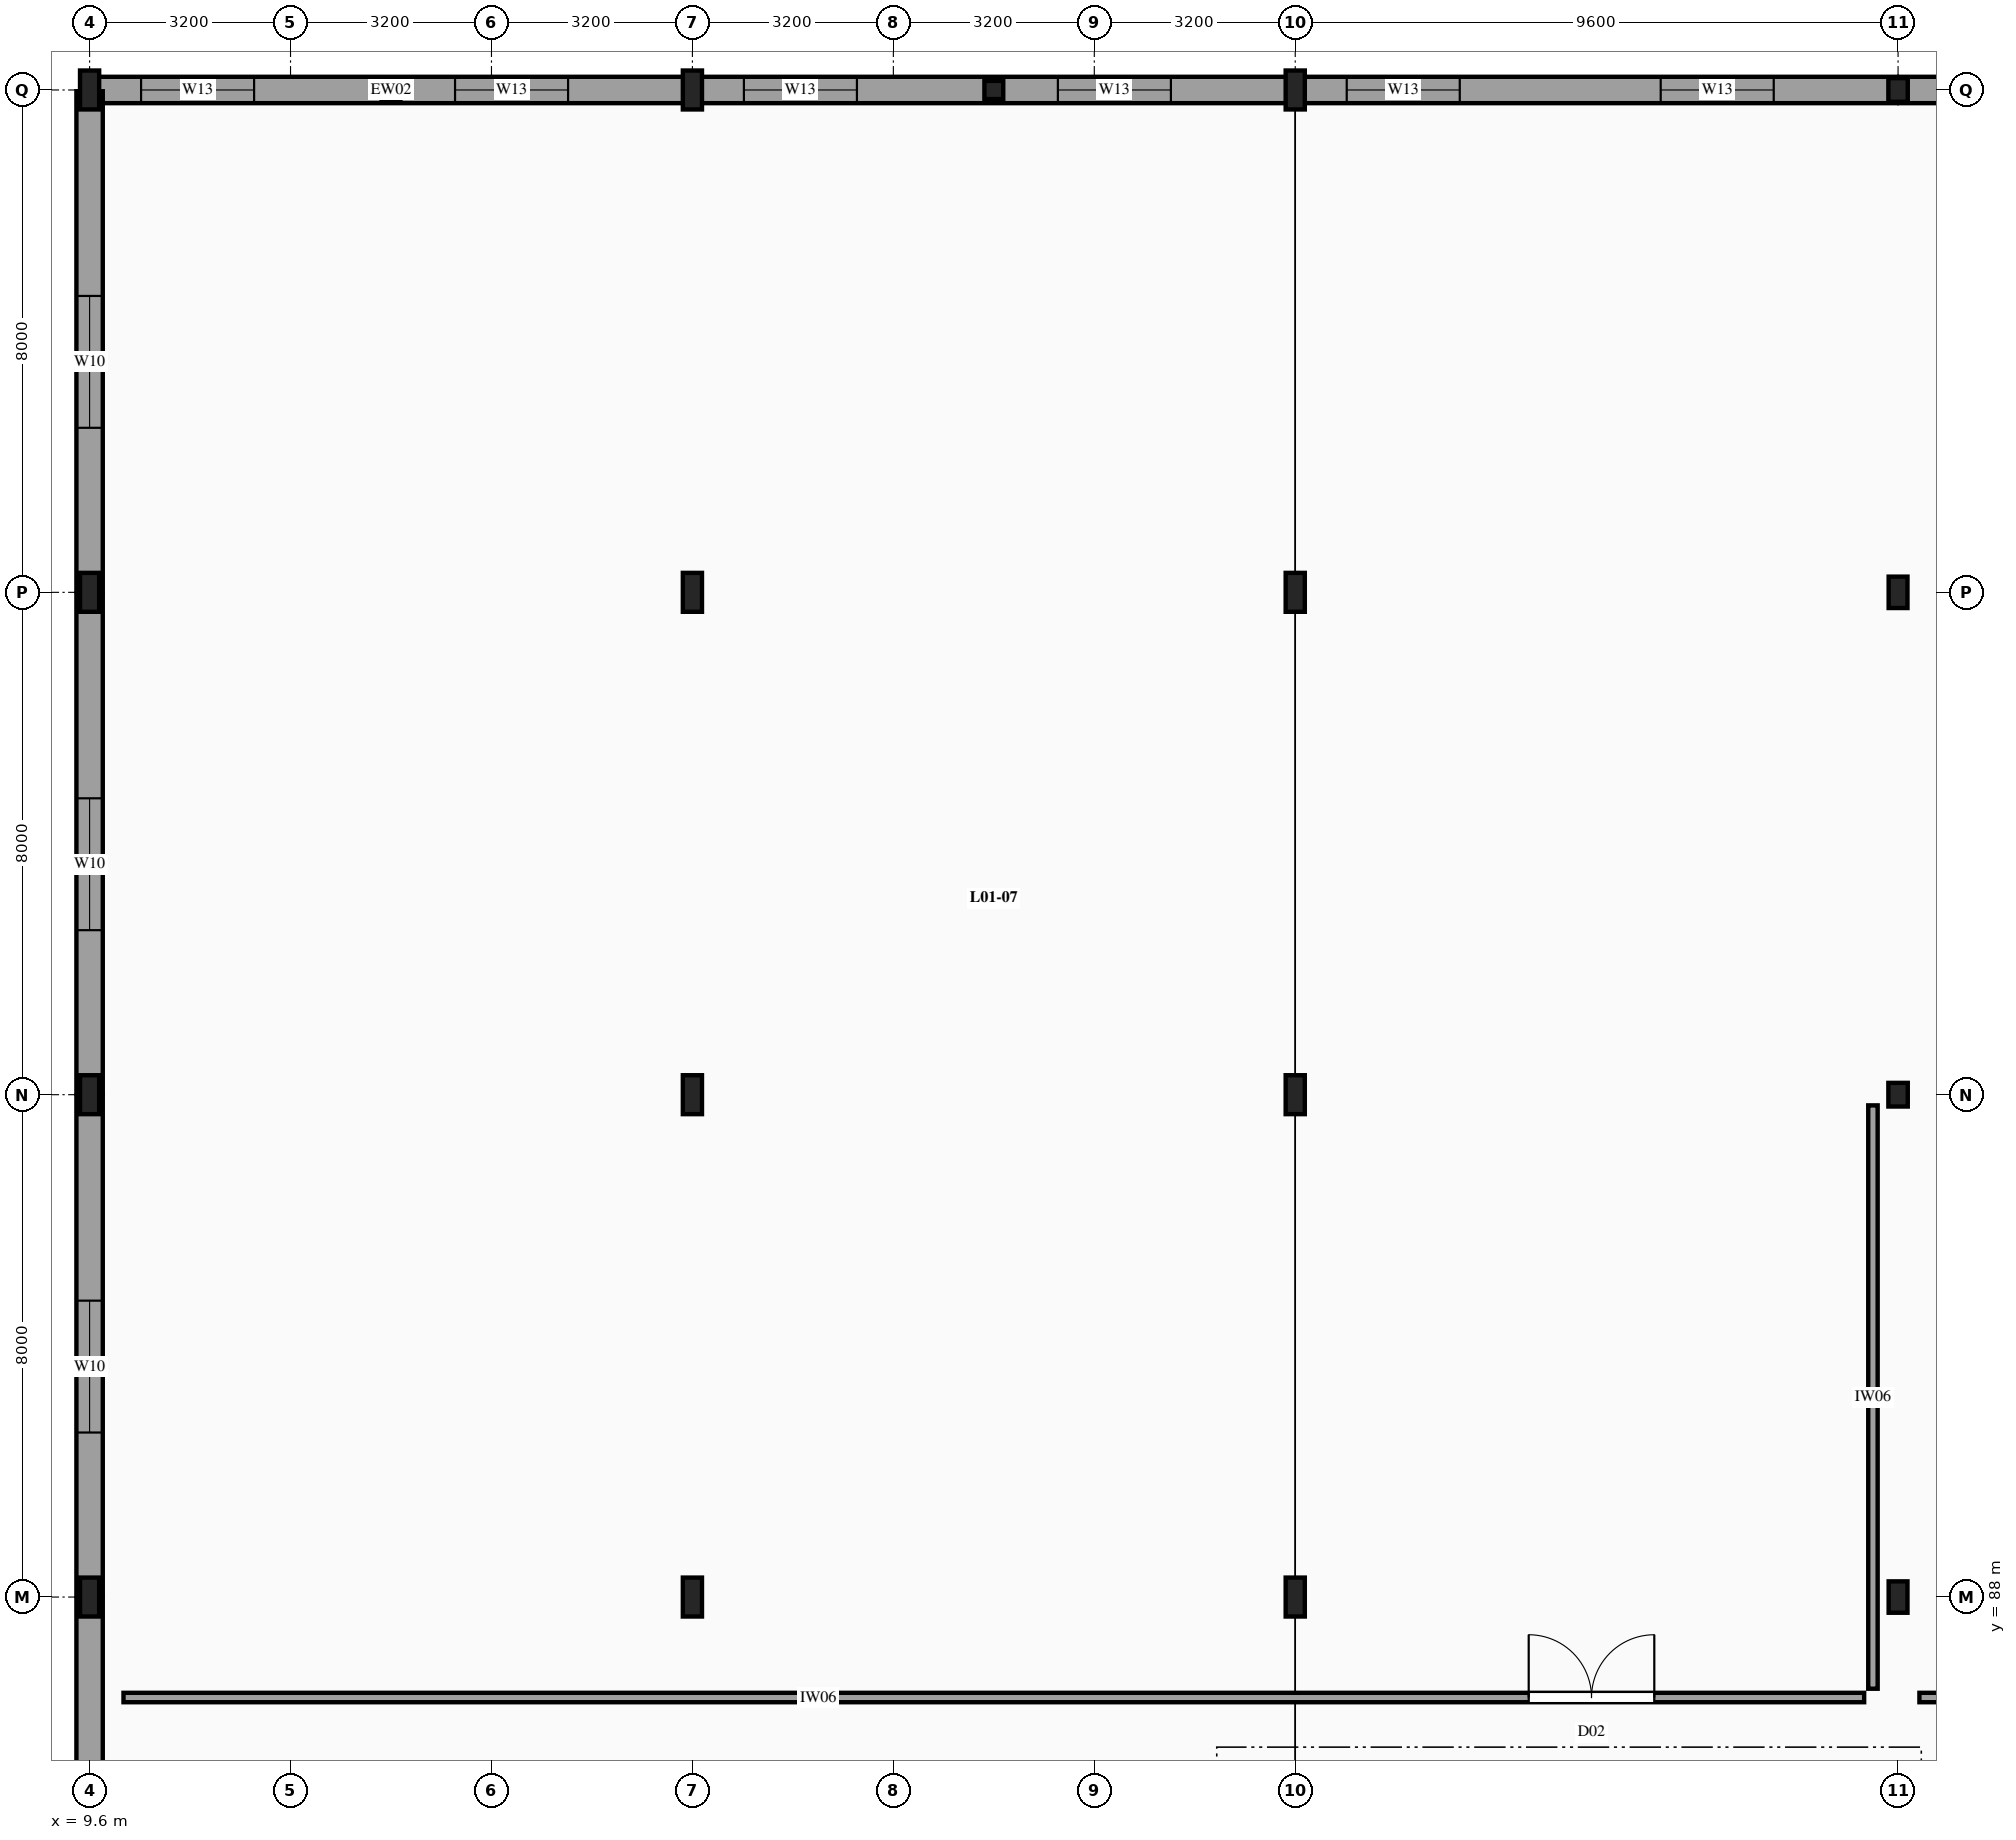
"""IFC4 building model, lengths in metres.
Left out: names, types, materials, properties, quantities, classifications, styles, units other than length and angle.
Written with IfcOpenShell. Run it as: python <this file> out.ifc"""

import sys

from ifc_helpers import new_model, si_unit, direction, frame, frame_2d, origin, origin_2d, place, context, subcontext, project, spatial, rectangle, i_section, extrude, element, fill, save


model = new_model("IFC4")
c1 = context("Model", 3, precision=1e-05, world=origin(), true_north=direction((0.0, 1.0)))
c2 = subcontext(c1, "Body", "Model", "MODEL_VIEW")
j1 = project(units=[si_unit("LENGTHUNIT", "METRE"), si_unit("PLANEANGLEUNIT", "RADIAN")], contexts=[c1])
p1 = place(None, origin())
s1 = spatial("IfcSite", under=j1, at=p1, CompositionType="ELEMENT")
p2 = place(p1, origin())
s2 = spatial("IfcBuilding", under=s1, at=p2, CompositionType="ELEMENT")
p3 = place(p2, frame((0.0, 0.0, 4.5)))
s3 = spatial("IfcBuildingStorey", under=s2, at=p3, CompositionType="ELEMENT", Elevation=4.5)
for number, where, z_axis, x_axis in (
    (1, (9.6, 88.0, -0.26), (0.0, 0.0, 1.0), (1.0, 0.0, 0.0)),
    (2, (9.6, 96.0, -0.26), (0.0, 0.0, 1.0), (1.0, 0.0, 0.0)),
    (3, (9.6, 104.0, -0.26), (0.0, 0.0, 1.0), (1.0, 0.0, 0.0)),
    (4, (9.6, 112.0, -0.26), (0.0, 0.0, 1.0), (1.0, 0.0, 0.0)),
    (5, (19.2, 88.0, -0.26), (0.0, 0.0, 1.0), (1.0, 0.0, 0.0)),
    (6, (19.2, 96.0, -0.26), (0.0, 0.0, 1.0), (1.0, 0.0, 0.0)),
    (7, (19.2, 104.0, -0.26), (0.0, 0.0, 1.0), (1.0, 0.0, 0.0)),
    (8, (19.2, 112.0, -0.26), (0.0, 0.0, 1.0), (1.0, 0.0, 0.0)),
    (9, (28.8, 88.0, -0.26), (0.0, 0.0, 1.0), (1.0, 0.0, 0.0)),
    (10, (28.8, 96.0, -0.26), (0.0, 0.0, 1.0), (1.0, 0.0, 0.0)),
    (11, (28.8, 104.0, -0.26), (0.0, 0.0, 1.0), (1.0, 0.0, 0.0)),
    (12, (28.8, 112.0, -0.26), (0.0, 0.0, 1.0), (1.0, 0.0, 0.0)),
):
    element("IfcColumn", number, at=place(p3, frame(where, z_axis=z_axis, x_axis=x_axis)), inside=s3, PredefinedType="COLUMN", context=c2, shape_type="SweptSolid", body=[
        extrude(i_section(OverallWidth=0.305, OverallDepth=0.62, WebThickness=0.021, FlangeThickness=0.04, FilletRadius=0.027, at=origin_2d()), origin(), (0.0, 0.0, 1.0), 4.2),
    ])
p4 = place(p3, frame((38.4, 88.0, -0.26), z_axis=(0.0, 0.0, 1.0), x_axis=(1.0, 0.0, 0.0)))
e13 = element("IfcColumn", 13, at=p4, inside=s3, PredefinedType="COLUMN", context=c2, shape_type="SweptSolid", body=[
    extrude(i_section(OverallWidth=0.3, OverallDepth=0.5, WebThickness=0.014, FlangeThickness=0.028, FilletRadius=0.027, at=origin_2d()), origin(), (0.0, 0.0, 1.0), 4.2),
])
p5 = place(p3, frame((38.4, 96.0, -0.26), z_axis=(0.0, 0.0, 1.0), x_axis=(1.0, 0.0, 0.0)))
e14 = element("IfcColumn", 14, at=p5, inside=s3, PredefinedType="COLUMN", context=c2, shape_type="SweptSolid", body=[
    extrude(i_section(OverallWidth=0.309, OverallDepth=0.377, WebThickness=0.021, FlangeThickness=0.04, FilletRadius=0.027, at=origin_2d()), origin(), (0.0, 0.0, 1.0), 4.2),
])
p6 = place(p3, frame((38.4, 104.0, -0.26), z_axis=(0.0, 0.0, 1.0), x_axis=(1.0, 0.0, 0.0)))
e15 = element("IfcColumn", 15, at=p6, inside=s3, PredefinedType="COLUMN", context=c2, shape_type="SweptSolid", body=[
    extrude(i_section(OverallWidth=0.3, OverallDepth=0.5, WebThickness=0.014, FlangeThickness=0.028, FilletRadius=0.027, at=origin_2d()), origin(), (0.0, 0.0, 1.0), 4.2),
])
p7 = place(p3, frame((38.4, 112.0, -0.26), z_axis=(0.0, 0.0, 1.0), x_axis=(1.0, 0.0, 0.0)))
e16 = element("IfcColumn", 16, at=p7, inside=s3, PredefinedType="COLUMN", context=c2, shape_type="SweptSolid", body=[
    extrude(i_section(OverallWidth=0.309, OverallDepth=0.377, WebThickness=0.021, FlangeThickness=0.04, FilletRadius=0.027, at=origin_2d()), origin(), (0.0, 0.0, 1.0), 4.2),
])
for number, where, z_axis, x_axis in (
    (17, (14.4, 112.0, -0.26), (0.0, 0.0, 1.0), (1.0, 0.0, 0.0)),
    (18, (24.0, 112.0, -0.26), (0.0, 0.0, 1.0), (1.0, 0.0, 0.0)),
):
    element("IfcColumn", number, at=place(p3, frame(where, z_axis=z_axis, x_axis=x_axis)), inside=s3, PredefinedType="PILASTER", context=c2, shape_type="SweptSolid", body=[
        extrude(i_section(OverallWidth=0.3, OverallDepth=0.29, WebThickness=0.009, FlangeThickness=0.014, FilletRadius=0.027, at=origin_2d()), origin(), (0.0, 0.0, 1.0), 4.2),
    ])
p8 = place(p3, frame((9.62, 112.0, 0.0), z_axis=(0.0, 0.0, 1.0), x_axis=(1.0, 0.0, 0.0)))
e19 = element("IfcWall", 19, at=p8, inside=s3, PredefinedType="SOLIDWALL", context=c2, shape_type="SweptSolid", body=[
    extrude(rectangle(XDim=9.56, YDim=0.42, at=frame_2d((4.78, 0.0))), origin(), (0.0, 0.0, 1.0), 3.26),
])
p9 = place(p8, frame((0.8, 0.0, 0.72)))
e20 = element("IfcOpeningElement", 20, at=p9, cuts=e19, PredefinedType="OPENING", context=c2, shape_type="SweptSolid", body=[
    extrude(rectangle(XDim=1.8, YDim=1.6, at=frame_2d((0.9, 0.8))), frame((0.0, 0.22, 0.0), z_axis=(0.0, -1.0, 0.0), x_axis=(1.0, 0.0, 0.0)), (0.0, 0.0, 1.0), 0.44),
])
p10 = place(p8, frame((5.8, 0.0, 0.72)))
e21 = element("IfcOpeningElement", 21, at=p10, cuts=e19, PredefinedType="OPENING", context=c2, shape_type="SweptSolid", body=[
    extrude(rectangle(XDim=1.8, YDim=1.6, at=frame_2d((0.9, 0.8))), frame((0.0, 0.22, 0.0), z_axis=(0.0, -1.0, 0.0), x_axis=(1.0, 0.0, 0.0)), (0.0, 0.0, 1.0), 0.44),
])
p11 = place(p3, frame((19.22, 112.0, 0.0), z_axis=(0.0, 0.0, 1.0), x_axis=(1.0, 0.0, 0.0)))
e22 = element("IfcWall", 22, at=p11, inside=s3, PredefinedType="SOLIDWALL", context=c2, shape_type="SweptSolid", body=[
    extrude(rectangle(XDim=9.56, YDim=0.42, at=frame_2d((4.78, 0.0))), origin(), (0.0, 0.0, 1.0), 3.26),
])
p12 = place(p11, frame((0.8, 0.0, 0.72)))
e23 = element("IfcOpeningElement", 23, at=p12, cuts=e22, PredefinedType="OPENING", context=c2, shape_type="SweptSolid", body=[
    extrude(rectangle(XDim=1.8, YDim=1.6, at=frame_2d((0.9, 0.8))), frame((0.0, 0.22, 0.0), z_axis=(0.0, -1.0, 0.0), x_axis=(1.0, 0.0, 0.0)), (0.0, 0.0, 1.0), 0.44),
])
p13 = place(p11, frame((5.8, 0.0, 0.72)))
e24 = element("IfcOpeningElement", 24, at=p13, cuts=e22, PredefinedType="OPENING", context=c2, shape_type="SweptSolid", body=[
    extrude(rectangle(XDim=1.8, YDim=1.6, at=frame_2d((0.9, 0.8))), frame((0.0, 0.22, 0.0), z_axis=(0.0, -1.0, 0.0), x_axis=(1.0, 0.0, 0.0)), (0.0, 0.0, 1.0), 0.44),
])
p14 = place(p3, frame((28.82, 112.0, 0.0), z_axis=(0.0, 0.0, 1.0), x_axis=(1.0, 0.0, 0.0)))
e25 = element("IfcWall", 25, at=p14, inside=s3, PredefinedType="SOLIDWALL", context=c2, shape_type="SweptSolid", body=[
    extrude(rectangle(XDim=9.56, YDim=0.42, at=frame_2d((4.78, 0.0))), origin(), (0.0, 0.0, 1.0), 3.26),
])
p15 = place(p14, frame((0.8, 0.0, 0.72)))
e26 = element("IfcOpeningElement", 26, at=p15, cuts=e25, PredefinedType="OPENING", context=c2, shape_type="SweptSolid", body=[
    extrude(rectangle(XDim=1.8, YDim=1.6, at=frame_2d((0.9, 0.8))), frame((0.0, 0.22, 0.0), z_axis=(0.0, -1.0, 0.0), x_axis=(1.0, 0.0, 0.0)), (0.0, 0.0, 1.0), 0.44),
])
p16 = place(p14, frame((5.8, 0.0, 0.72)))
e27 = element("IfcOpeningElement", 27, at=p16, cuts=e25, PredefinedType="OPENING", context=c2, shape_type="SweptSolid", body=[
    extrude(rectangle(XDim=1.8, YDim=1.6, at=frame_2d((0.9, 0.8))), frame((0.0, 0.22, 0.0), z_axis=(0.0, -1.0, 0.0), x_axis=(1.0, 0.0, 0.0)), (0.0, 0.0, 1.0), 0.44),
])
p17 = place(p3, frame((38.42, 112.0, 0.0), z_axis=(0.0, 0.0, 1.0), x_axis=(1.0, 0.0, 0.0)))
e28 = element("IfcWall", 28, at=p17, inside=s3, PredefinedType="SOLIDWALL", context=c2, shape_type="SweptSolid", body=[
    extrude(rectangle(XDim=9.56, YDim=0.42, at=frame_2d((4.78, 0.0))), origin(), (0.0, 0.0, 1.0), 3.26),
])
p18 = place(p3, frame((9.6, 80.02, 0.0), z_axis=(0.0, 0.0, 1.0), x_axis=(0.0, 1.0, 0.0)))
e29 = element("IfcWall", 29, at=p18, inside=s3, PredefinedType="SOLIDWALL", context=c2, shape_type="SweptSolid", body=[
    extrude(rectangle(XDim=7.96, YDim=0.42, at=frame_2d((3.98, 0.0))), origin(), (0.0, 0.0, 1.0), 3.26),
])
p19 = place(p18, frame((2.6, 0.0, 0.9)))
e30 = element("IfcOpeningElement", 30, at=p19, cuts=e29, PredefinedType="OPENING", context=c2, shape_type="SweptSolid", body=[
    extrude(rectangle(XDim=2.1, YDim=2.1, at=frame_2d((1.05, 1.05))), frame((0.0, 0.22, 0.0), z_axis=(0.0, -1.0, 0.0), x_axis=(1.0, 0.0, 0.0)), (0.0, 0.0, 1.0), 0.44),
])
p20 = place(p3, frame((9.6, 88.02, 0.0), z_axis=(0.0, 0.0, 1.0), x_axis=(0.0, 1.0, 0.0)))
e31 = element("IfcWall", 31, at=p20, inside=s3, PredefinedType="SOLIDWALL", context=c2, shape_type="SweptSolid", body=[
    extrude(rectangle(XDim=7.96, YDim=0.42, at=frame_2d((3.98, 0.0))), origin(), (0.0, 0.0, 1.0), 3.26),
])
p21 = place(p20, frame((2.6, 0.0, 0.9)))
e32 = element("IfcOpeningElement", 32, at=p21, cuts=e31, PredefinedType="OPENING", context=c2, shape_type="SweptSolid", body=[
    extrude(rectangle(XDim=2.1, YDim=2.1, at=frame_2d((1.05, 1.05))), frame((0.0, 0.22, 0.0), z_axis=(0.0, -1.0, 0.0), x_axis=(1.0, 0.0, 0.0)), (0.0, 0.0, 1.0), 0.44),
])
p22 = place(p3, frame((9.6, 96.02, 0.0), z_axis=(0.0, 0.0, 1.0), x_axis=(0.0, 1.0, 0.0)))
e33 = element("IfcWall", 33, at=p22, inside=s3, PredefinedType="SOLIDWALL", context=c2, shape_type="SweptSolid", body=[
    extrude(rectangle(XDim=7.96, YDim=0.42, at=frame_2d((3.98, 0.0))), origin(), (0.0, 0.0, 1.0), 3.26),
])
p23 = place(p22, frame((2.6, 0.0, 0.9)))
e34 = element("IfcOpeningElement", 34, at=p23, cuts=e33, PredefinedType="OPENING", context=c2, shape_type="SweptSolid", body=[
    extrude(rectangle(XDim=2.1, YDim=2.1, at=frame_2d((1.05, 1.05))), frame((0.0, 0.22, 0.0), z_axis=(0.0, -1.0, 0.0), x_axis=(1.0, 0.0, 0.0)), (0.0, 0.0, 1.0), 0.44),
])
p24 = place(p3, frame((9.6, 104.02, 0.0), z_axis=(0.0, 0.0, 1.0), x_axis=(0.0, 1.0, 0.0)))
e35 = element("IfcWall", 35, at=p24, inside=s3, PredefinedType="SOLIDWALL", context=c2, shape_type="SweptSolid", body=[
    extrude(rectangle(XDim=7.96, YDim=0.42, at=frame_2d((3.98, 0.0))), origin(), (0.0, 0.0, 1.0), 3.26),
])
p25 = place(p24, frame((2.6, 0.0, 0.9)))
e36 = element("IfcOpeningElement", 36, at=p25, cuts=e35, PredefinedType="OPENING", context=c2, shape_type="SweptSolid", body=[
    extrude(rectangle(XDim=2.1, YDim=2.1, at=frame_2d((1.05, 1.05))), frame((0.0, 0.22, 0.0), z_axis=(0.0, -1.0, 0.0), x_axis=(1.0, 0.0, 0.0)), (0.0, 0.0, 1.0), 0.44),
])
p26 = place(p3, frame((10.14, 86.4, 0.0), z_axis=(0.0, 0.0, 1.0), x_axis=(1.0, 0.0, 0.0)))
e37 = element("IfcWall", 37, at=p26, inside=s3, PredefinedType="PARTITIONING", context=c2, shape_type="SweptSolid", body=[
    extrude(rectangle(XDim=27.72, YDim=0.15, at=frame_2d((13.86, 0.0))), origin(), (0.0, 0.0, 1.0), 3.1),
])
p27 = place(p26, frame((22.378, 0.0, 0.0)))
e38 = element("IfcOpeningElement", 38, at=p27, cuts=e37, PredefinedType="OPENING", context=c2, shape_type="SweptSolid", body=[
    extrude(rectangle(XDim=2.0, YDim=2.6, at=frame_2d((1.0, 1.3))), frame((0.0, 0.085, 0.0), z_axis=(0.0, -1.0, 0.0), x_axis=(1.0, 0.0, 0.0)), (0.0, 0.0, 1.0), 0.17),
])
p28 = place(p3, frame((38.0, 86.54, 0.0), z_axis=(0.0, 0.0, 1.0), x_axis=(0.0, 1.0, 0.0)))
e39 = element("IfcWall", 39, at=p28, inside=s3, PredefinedType="PARTITIONING", context=c2, shape_type="SweptSolid", body=[
    extrude(rectangle(XDim=9.29, YDim=0.15, at=frame_2d((4.645, 0.0))), origin(), (0.0, 0.0, 1.0), 3.1),
])
p29 = place(p3, frame((38.74, 86.4, 0.0), z_axis=(0.0, 0.0, 1.0), x_axis=(1.0, 0.0, 0.0)))
e40 = element("IfcWall", 40, at=p29, inside=s3, PredefinedType="PARTITIONING", context=c2, shape_type="SweptSolid", body=[
    extrude(rectangle(XDim=18.32, YDim=0.15, at=frame_2d((9.16, 0.0))), origin(), (0.0, 0.0, 1.0), 3.1),
])
p30 = place(p29, frame((13.106, 0.0, 0.0)))
e41 = element("IfcOpeningElement", 41, at=p30, cuts=e40, PredefinedType="OPENING", context=c2, shape_type="SweptSolid", body=[
    extrude(rectangle(XDim=1.85, YDim=2.5, at=frame_2d((0.925, 1.25))), frame((0.0, 0.085, 0.0), z_axis=(0.0, -1.0, 0.0), x_axis=(1.0, 0.0, 0.0)), (0.0, 0.0, 1.0), 0.17),
])
p31 = place(p9, origin())
e42 = element("IfcWindow", 42, at=p31, inside=s3, PartitioningType="SINGLE_PANEL", PredefinedType="WINDOW", context=c2, shape_type="SweptSolid", body=[
    extrude(rectangle(XDim=1.8, YDim=1.6, at=frame_2d((0.9, 0.8))), frame((0.0, 0.03, 0.0), z_axis=(0.0, -1.0, 0.0), x_axis=(1.0, 0.0, 0.0)), (0.0, 0.0, 1.0), 0.06),
])
fill(e20, e42)
p32 = place(p10, origin())
e43 = element("IfcWindow", 43, at=p32, inside=s3, PartitioningType="SINGLE_PANEL", PredefinedType="WINDOW", context=c2, shape_type="SweptSolid", body=[
    extrude(rectangle(XDim=1.8, YDim=1.6, at=frame_2d((0.9, 0.8))), frame((0.0, 0.03, 0.0), z_axis=(0.0, -1.0, 0.0), x_axis=(1.0, 0.0, 0.0)), (0.0, 0.0, 1.0), 0.06),
])
fill(e21, e43)
p33 = place(p12, origin())
e44 = element("IfcWindow", 44, at=p33, inside=s3, PartitioningType="SINGLE_PANEL", PredefinedType="WINDOW", context=c2, shape_type="SweptSolid", body=[
    extrude(rectangle(XDim=1.8, YDim=1.6, at=frame_2d((0.9, 0.8))), frame((0.0, 0.03, 0.0), z_axis=(0.0, -1.0, 0.0), x_axis=(1.0, 0.0, 0.0)), (0.0, 0.0, 1.0), 0.06),
])
fill(e23, e44)
p34 = place(p13, origin())
e45 = element("IfcWindow", 45, at=p34, inside=s3, PartitioningType="SINGLE_PANEL", PredefinedType="WINDOW", context=c2, shape_type="SweptSolid", body=[
    extrude(rectangle(XDim=1.8, YDim=1.6, at=frame_2d((0.9, 0.8))), frame((0.0, 0.03, 0.0), z_axis=(0.0, -1.0, 0.0), x_axis=(1.0, 0.0, 0.0)), (0.0, 0.0, 1.0), 0.06),
])
fill(e24, e45)
p35 = place(p15, origin())
e46 = element("IfcWindow", 46, at=p35, inside=s3, PartitioningType="SINGLE_PANEL", PredefinedType="WINDOW", context=c2, shape_type="SweptSolid", body=[
    extrude(rectangle(XDim=1.8, YDim=1.6, at=frame_2d((0.9, 0.8))), frame((0.0, 0.03, 0.0), z_axis=(0.0, -1.0, 0.0), x_axis=(1.0, 0.0, 0.0)), (0.0, 0.0, 1.0), 0.06),
])
fill(e26, e46)
p36 = place(p16, origin())
e47 = element("IfcWindow", 47, at=p36, inside=s3, PartitioningType="SINGLE_PANEL", PredefinedType="WINDOW", context=c2, shape_type="SweptSolid", body=[
    extrude(rectangle(XDim=1.8, YDim=1.6, at=frame_2d((0.9, 0.8))), frame((0.0, 0.03, 0.0), z_axis=(0.0, -1.0, 0.0), x_axis=(1.0, 0.0, 0.0)), (0.0, 0.0, 1.0), 0.06),
])
fill(e27, e47)
p37 = place(p21, origin())
e48 = element("IfcWindow", 48, at=p37, inside=s3, PartitioningType="SINGLE_PANEL", PredefinedType="WINDOW", context=c2, shape_type="SweptSolid", body=[
    extrude(rectangle(XDim=2.1, YDim=2.1, at=frame_2d((1.05, 1.05))), frame((0.0, 0.03, 0.0), z_axis=(0.0, -1.0, 0.0), x_axis=(1.0, 0.0, 0.0)), (0.0, 0.0, 1.0), 0.06),
])
fill(e32, e48)
p38 = place(p23, origin())
e49 = element("IfcWindow", 49, at=p38, inside=s3, PartitioningType="SINGLE_PANEL", PredefinedType="WINDOW", context=c2, shape_type="SweptSolid", body=[
    extrude(rectangle(XDim=2.1, YDim=2.1, at=frame_2d((1.05, 1.05))), frame((0.0, 0.03, 0.0), z_axis=(0.0, -1.0, 0.0), x_axis=(1.0, 0.0, 0.0)), (0.0, 0.0, 1.0), 0.06),
])
fill(e34, e49)
p39 = place(p25, origin())
e50 = element("IfcWindow", 50, at=p39, inside=s3, PartitioningType="SINGLE_PANEL", PredefinedType="WINDOW", context=c2, shape_type="SweptSolid", body=[
    extrude(rectangle(XDim=2.1, YDim=2.1, at=frame_2d((1.05, 1.05))), frame((0.0, 0.03, 0.0), z_axis=(0.0, -1.0, 0.0), x_axis=(1.0, 0.0, 0.0)), (0.0, 0.0, 1.0), 0.06),
])
fill(e36, e50)
p40 = place(p27, origin())
e51 = element("IfcDoor", 51, at=p40, inside=s3, OperationType="DOUBLE_DOOR_SINGLE_SWING", PredefinedType="DOOR", context=c2, shape_type="SweptSolid", body=[
    extrude(rectangle(XDim=2.0, YDim=2.6, at=frame_2d((1.0, 1.3))), frame((0.0, 0.025, 0.0), z_axis=(0.0, -1.0, 0.0), x_axis=(1.0, 0.0, 0.0)), (0.0, 0.0, 1.0), 0.05),
])
fill(e38, e51)
save(model, sys.argv[1])
